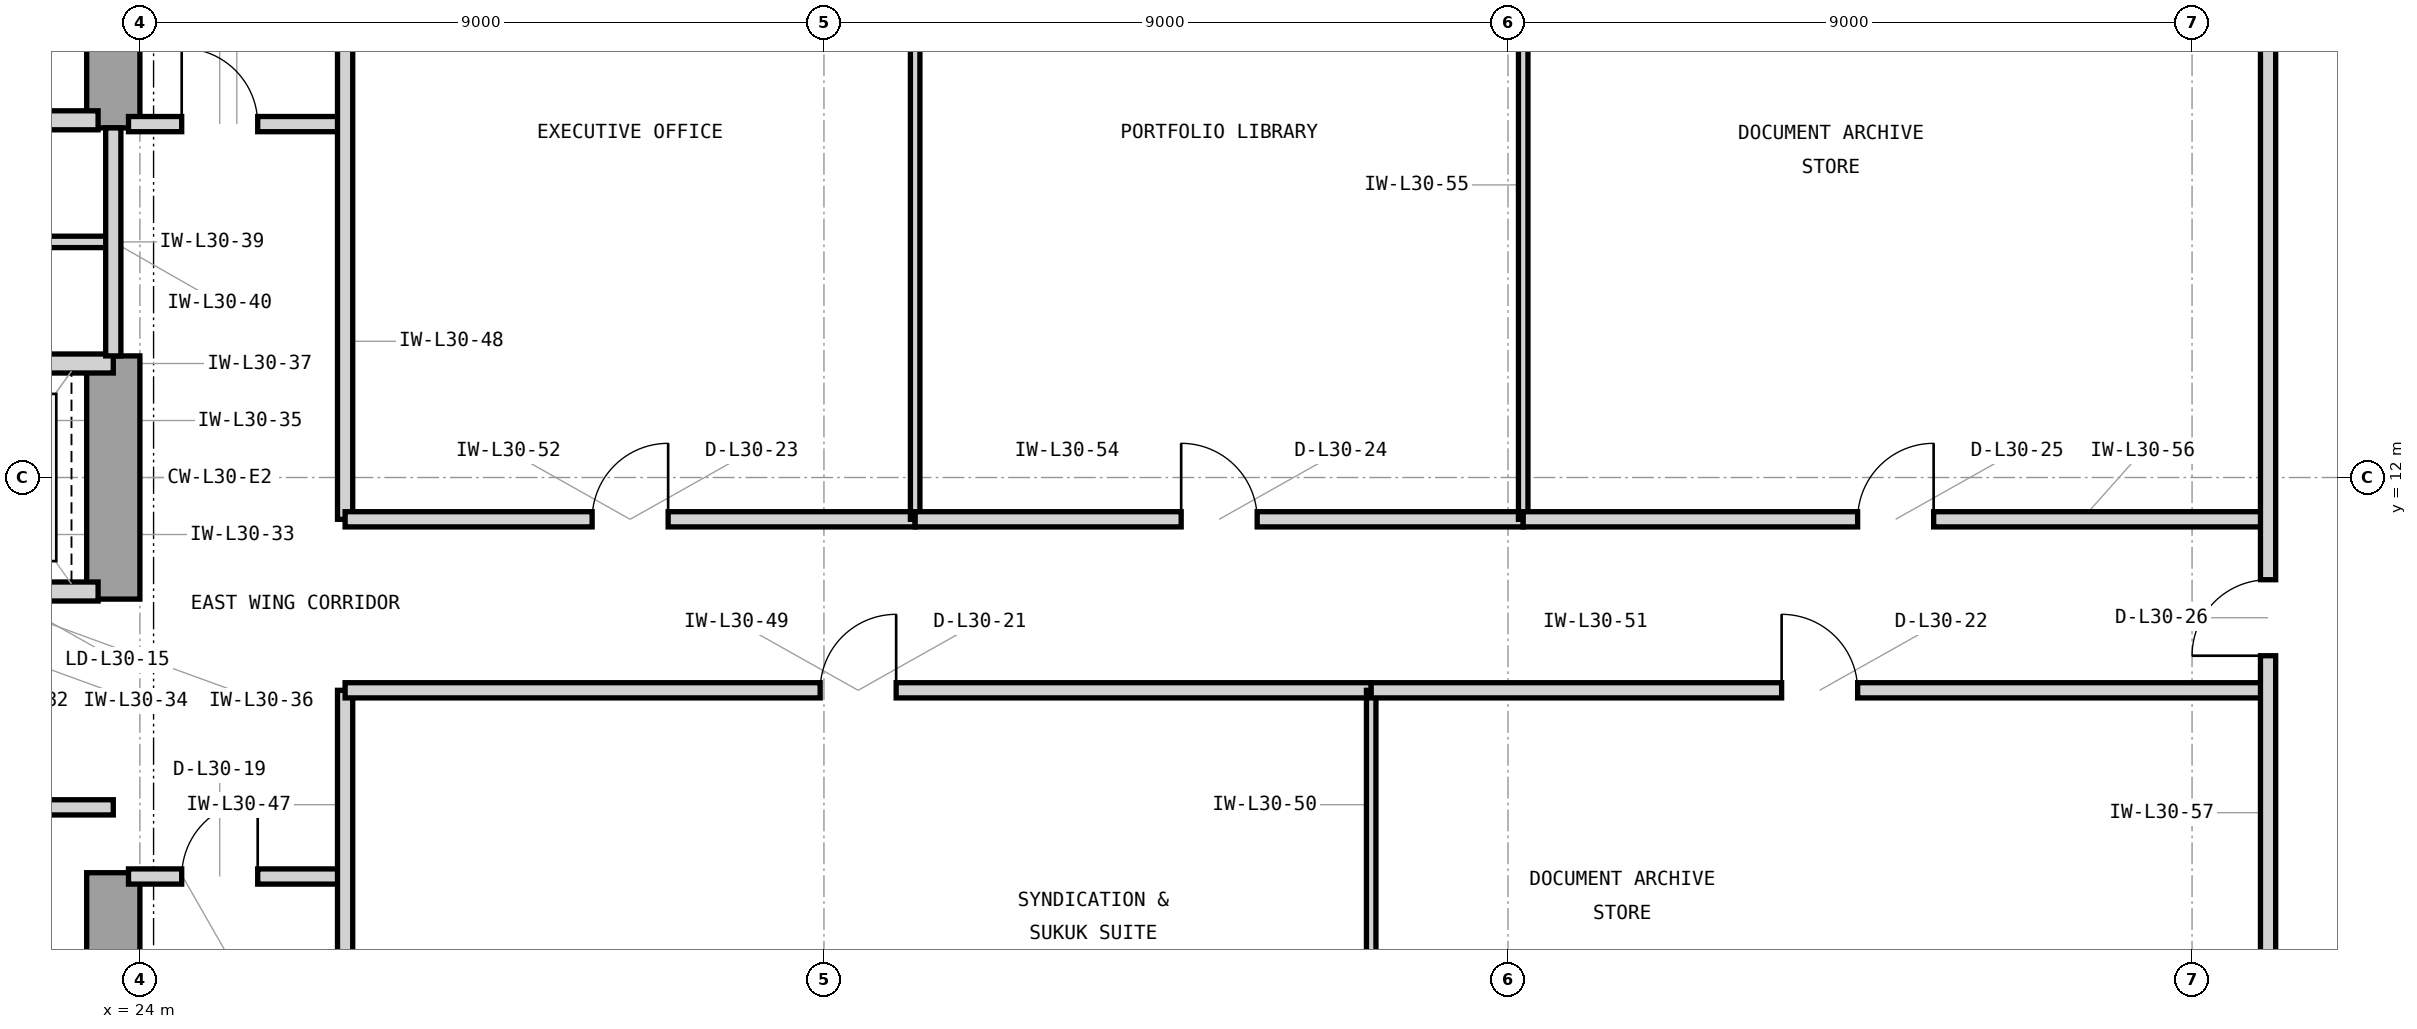
"""IFC4 building model, lengths in metres.
Left out: names, types, materials, properties, quantities, classifications, styles, units other than length and angle.
Written with IfcOpenShell. Run it as: python <this file> out.ifc"""

import sys

from ifc_helpers import new_model, si_unit, direction, frame, frame_2d, origin, place, context, subcontext, project, spatial, rectangle, extrude, element, fill, save


model = new_model("IFC4")
c1 = context("Model", 3, precision=1e-05, world=origin(), true_north=direction((0.0, 1.0)))
c2 = subcontext(c1, "Body", "Model", "MODEL_VIEW")
j1 = project(units=[si_unit("LENGTHUNIT", "METRE"), si_unit("PLANEANGLEUNIT", "RADIAN")], contexts=[c1])
p1 = place(None, origin())
s1 = spatial("IfcSite", under=j1, at=p1, CompositionType="ELEMENT")
p2 = place(p1, origin())
s2 = spatial("IfcBuilding", under=s1, at=p2, CompositionType="ELEMENT")
p3 = place(p2, frame((0.0, 0.0, 128.4)))
s3 = spatial("IfcBuildingStorey", under=s2, at=p3, CompositionType="ELEMENT", Elevation=128.4)
p4 = place(p3, frame((23.65, 3.7, 0.0), z_axis=(0.0, 0.0, 1.0), x_axis=(0.0, 1.0, 0.0)))
e1 = element("IfcWall", 1, at=p4, inside=s3, PredefinedType="SHEAR", context=c2, shape_type="SweptSolid", body=[
    extrude(rectangle(XDim=3.1, YDim=0.7, at=frame_2d((1.55, 0.0))), origin(), (0.0, 0.0, 1.0), 3.9),
])
p5 = place(p3, frame((23.65, 10.4, 0.0), z_axis=(0.0, 0.0, 1.0), x_axis=(0.0, 1.0, 0.0)))
e2 = element("IfcWall", 2, at=p5, inside=s3, PredefinedType="SHEAR", context=c2, shape_type="SweptSolid", body=[
    extrude(rectangle(XDim=3.2, YDim=0.7, at=frame_2d((1.6, 0.0))), origin(), (0.0, 0.0, 1.0), 3.9),
])
p6 = place(p3, frame((23.65, 16.6, 0.0), z_axis=(0.0, 0.0, 1.0), x_axis=(0.0, 1.0, 0.0)))
e3 = element("IfcWall", 3, at=p6, inside=s3, PredefinedType="SHEAR", context=c2, shape_type="SweptSolid", body=[
    extrude(rectangle(XDim=4.05, YDim=0.7, at=frame_2d((2.025, 0.0))), origin(), (0.0, 0.0, 1.0), 3.9),
])
p7 = place(p3, frame((21.05, 16.7, 0.0), z_axis=(0.0, 0.0, 1.0), x_axis=(1.0, 0.0, 0.0)))
e4 = element("IfcWall", 4, at=p7, inside=s3, PredefinedType="PARTITIONING", context=c2, shape_type="SweptSolid", body=[
    extrude(rectangle(XDim=2.4, YDim=0.25, at=frame_2d((1.2, 0.0))), origin(), (0.0, 0.0, 1.0), 3.233),
])
p8 = place(p3, frame((20.85, 7.66, 0.0), z_axis=(0.0, 0.0, 1.0), x_axis=(1.0, 0.0, 0.0)))
e5 = element("IfcWall", 5, at=p8, inside=s3, PredefinedType="PARTITIONING", context=c2, shape_type="SweptSolid", body=[
    extrude(rectangle(XDim=2.8, YDim=0.2, at=frame_2d((1.4, 0.0))), origin(), (0.0, 0.0, 1.0), 3.69),
])
p9 = place(p8, frame((0.95, 0.0, 0.0)))
e6 = element("IfcOpeningElement", 6, at=p9, cuts=e5, PredefinedType="OPENING", context=c2, shape_type="SweptSolid", body=[
    extrude(rectangle(XDim=0.9, YDim=2.1, at=frame_2d((0.45, 1.05))), frame((0.0, 0.11, 0.0), z_axis=(0.0, -1.0, 0.0), x_axis=(1.0, 0.0, 0.0)), (0.0, 0.0, 1.0), 0.22),
])
p10 = place(p3, frame((21.05, 10.5, 0.0), z_axis=(0.0, 0.0, 1.0), x_axis=(1.0, 0.0, 0.0)))
e7 = element("IfcWall", 7, at=p10, inside=s3, PredefinedType="PARTITIONING", context=c2, shape_type="SweptSolid", body=[
    extrude(rectangle(XDim=2.4, YDim=0.25, at=frame_2d((1.2, 0.0))), origin(), (0.0, 0.0, 1.0), 3.233),
])
p11 = place(p10, frame((0.48, 0.0, 0.0)))
e8 = element("IfcOpeningElement", 8, at=p11, cuts=e7, PredefinedType="OPENING", context=c2, shape_type="SweptSolid", body=[
    extrude(rectangle(XDim=1.15, YDim=2.25, at=frame_2d((0.575, 1.125))), frame((0.0, 0.135, 0.0), z_axis=(0.0, -1.0, 0.0), x_axis=(1.0, 0.0, 0.0)), (0.0, 0.0, 1.0), 0.27),
])
p12 = place(p3, frame((14.7, 13.5, 0.0), z_axis=(0.0, 0.0, 1.0), x_axis=(1.0, 0.0, 0.0)))
e9 = element("IfcWall", 9, at=p12, inside=s3, PredefinedType="PARTITIONING", context=c2, shape_type="SweptSolid", body=[
    extrude(rectangle(XDim=8.95, YDim=0.25, at=frame_2d((4.475, 0.0))), origin(), (0.0, 0.0, 1.0), 3.233),
])
p13 = place(p3, frame((18.45, 15.1, 0.0), z_axis=(0.0, 0.0, 1.0), x_axis=(1.0, 0.0, 0.0)))
e10 = element("IfcWall", 10, at=p13, inside=s3, PredefinedType="PARTITIONING", context=c2, shape_type="SweptSolid", body=[
    extrude(rectangle(XDim=5.2, YDim=0.15, at=frame_2d((2.6, 0.0))), origin(), (0.0, 0.0, 1.0), 3.69),
])
p14 = place(p3, frame((23.65, 13.6, 0.0), z_axis=(0.0, 0.0, 1.0), x_axis=(0.0, 1.0, 0.0)))
e11 = element("IfcWall", 11, at=p14, inside=s3, PredefinedType="PARTITIONING", context=c2, shape_type="SweptSolid", body=[
    extrude(rectangle(XDim=3.0, YDim=0.2, at=frame_2d((1.5, 0.0))), origin(), (0.0, 0.0, 1.0), 3.69),
])
p15 = place(p3, frame((23.85, 6.75, 0.0), z_axis=(0.0, 0.0, 1.0), x_axis=(1.0, 0.0, 0.0)))
e12 = element("IfcWall", 12, at=p15, inside=s3, PredefinedType="PARTITIONING", context=c2, shape_type="SweptSolid", body=[
    extrude(rectangle(XDim=2.85, YDim=0.2, at=frame_2d((1.425, 0.0))), origin(), (0.0, 0.0, 1.0), 3.69),
])
p16 = place(p15, frame((0.7, 0.0, 0.0)))
e13 = element("IfcOpeningElement", 13, at=p16, cuts=e12, PredefinedType="OPENING", context=c2, shape_type="SweptSolid", body=[
    extrude(rectangle(XDim=1.0, YDim=2.15, at=frame_2d((0.5, 1.075))), frame((0.0, 0.11, 0.0), z_axis=(0.0, -1.0, 0.0), x_axis=(1.0, 0.0, 0.0)), (0.0, 0.0, 1.0), 0.22),
])
p17 = place(p3, frame((23.85, 16.65, 0.0), z_axis=(0.0, 0.0, 1.0), x_axis=(1.0, 0.0, 0.0)))
e14 = element("IfcWall", 14, at=p17, inside=s3, PredefinedType="PARTITIONING", context=c2, shape_type="SweptSolid", body=[
    extrude(rectangle(XDim=2.85, YDim=0.2, at=frame_2d((1.425, 0.0))), origin(), (0.0, 0.0, 1.0), 3.69),
])
p18 = place(p17, frame((0.7, 0.0, 0.0)))
e15 = element("IfcOpeningElement", 15, at=p18, cuts=e14, PredefinedType="OPENING", context=c2, shape_type="SweptSolid", body=[
    extrude(rectangle(XDim=1.0, YDim=2.15, at=frame_2d((0.5, 1.075))), frame((0.0, 0.11, 0.0), z_axis=(0.0, -1.0, 0.0), x_axis=(1.0, 0.0, 0.0)), (0.0, 0.0, 1.0), 0.22),
])
p19 = place(p3, frame((26.7, 3.18, 0.0), z_axis=(0.0, 0.0, 1.0), x_axis=(0.0, 1.0, 0.0)))
e16 = element("IfcWall", 16, at=p19, inside=s3, PredefinedType="PARTITIONING", context=c2, shape_type="SweptSolid", body=[
    extrude(rectangle(XDim=6.02, YDim=0.2, at=frame_2d((3.01, 0.0))), origin(), (0.0, 0.0, 1.0), 3.69),
])
p20 = place(p3, frame((26.7, 11.45, 0.0), z_axis=(0.0, 0.0, 1.0), x_axis=(0.0, 1.0, 0.0)))
e17 = element("IfcWall", 17, at=p20, inside=s3, PredefinedType="PARTITIONING", context=c2, shape_type="SweptSolid", body=[
    extrude(rectangle(XDim=9.37, YDim=0.2, at=frame_2d((4.685, 0.0))), origin(), (0.0, 0.0, 1.0), 3.69),
])
p21 = place(p3, frame((26.7, 9.2, 0.0), z_axis=(0.0, 0.0, 1.0), x_axis=(1.0, 0.0, 0.0)))
e18 = element("IfcWall", 18, at=p21, inside=s3, PredefinedType="PARTITIONING", context=c2, shape_type="SweptSolid", body=[
    extrude(rectangle(XDim=13.5, YDim=0.2, at=frame_2d((6.75, 0.0))), origin(), (0.0, 0.0, 1.0), 3.69),
])
p22 = place(p21, frame((6.25, 0.0, 0.0)))
e19 = element("IfcOpeningElement", 19, at=p22, cuts=e18, PredefinedType="OPENING", context=c2, shape_type="SweptSolid", body=[
    extrude(rectangle(XDim=1.0, YDim=2.15, at=frame_2d((0.5, 1.075))), frame((0.0, 0.11, 0.0), z_axis=(0.0, -1.0, 0.0), x_axis=(1.0, 0.0, 0.0)), (0.0, 0.0, 1.0), 0.22),
])
p23 = place(p3, frame((40.2, 3.18, 0.0), z_axis=(0.0, 0.0, 1.0), x_axis=(0.0, 1.0, 0.0)))
e20 = element("IfcWall", 20, at=p23, inside=s3, PredefinedType="PARTITIONING", context=c2, shape_type="SweptSolid", body=[
    extrude(rectangle(XDim=6.02, YDim=0.125, at=frame_2d((3.01, 0.0))), origin(), (0.0, 0.0, 1.0), 3.69),
])
p24 = place(p3, frame((40.2, 9.2, 0.0), z_axis=(0.0, 0.0, 1.0), x_axis=(1.0, 0.0, 0.0)))
e21 = element("IfcWall", 21, at=p24, inside=s3, PredefinedType="PARTITIONING", context=c2, shape_type="SweptSolid", body=[
    extrude(rectangle(XDim=11.8, YDim=0.2, at=frame_2d((5.9, 0.0))), origin(), (0.0, 0.0, 1.0), 3.69),
])
p25 = place(p24, frame((5.4, 0.0, 0.0)))
e22 = element("IfcOpeningElement", 22, at=p25, cuts=e21, PredefinedType="OPENING", context=c2, shape_type="SweptSolid", body=[
    extrude(rectangle(XDim=1.0, YDim=2.15, at=frame_2d((0.5, 1.075))), frame((0.0, 0.11, 0.0), z_axis=(0.0, -1.0, 0.0), x_axis=(1.0, 0.0, 0.0)), (0.0, 0.0, 1.0), 0.22),
])
p26 = place(p3, frame((26.7, 11.45, 0.0), z_axis=(0.0, 0.0, 1.0), x_axis=(1.0, 0.0, 0.0)))
e23 = element("IfcWall", 23, at=p26, inside=s3, PredefinedType="PARTITIONING", context=c2, shape_type="SweptSolid", body=[
    extrude(rectangle(XDim=7.5, YDim=0.2, at=frame_2d((3.75, 0.0))), origin(), (0.0, 0.0, 1.0), 3.69),
])
p27 = place(p26, frame((3.25, 0.0, 0.0)))
e24 = element("IfcOpeningElement", 24, at=p27, cuts=e23, PredefinedType="OPENING", context=c2, shape_type="SweptSolid", body=[
    extrude(rectangle(XDim=1.0, YDim=2.15, at=frame_2d((0.5, 1.075))), frame((0.0, 0.11, 0.0), z_axis=(0.0, -1.0, 0.0), x_axis=(1.0, 0.0, 0.0)), (0.0, 0.0, 1.0), 0.22),
])
p28 = place(p3, frame((34.2, 11.45, 0.0), z_axis=(0.0, 0.0, 1.0), x_axis=(0.0, 1.0, 0.0)))
e25 = element("IfcWall", 25, at=p28, inside=s3, PredefinedType="PARTITIONING", context=c2, shape_type="SweptSolid", body=[
    extrude(rectangle(XDim=9.37, YDim=0.125, at=frame_2d((4.685, 0.0))), origin(), (0.0, 0.0, 1.0), 3.69),
])
p29 = place(p3, frame((34.2, 11.45, 0.0), z_axis=(0.0, 0.0, 1.0), x_axis=(1.0, 0.0, 0.0)))
e26 = element("IfcWall", 26, at=p29, inside=s3, PredefinedType="PARTITIONING", context=c2, shape_type="SweptSolid", body=[
    extrude(rectangle(XDim=8.0, YDim=0.2, at=frame_2d((4.0, 0.0))), origin(), (0.0, 0.0, 1.0), 3.69),
])
p30 = place(p29, frame((3.5, 0.0, 0.0)))
e27 = element("IfcOpeningElement", 27, at=p30, cuts=e26, PredefinedType="OPENING", context=c2, shape_type="SweptSolid", body=[
    extrude(rectangle(XDim=1.0, YDim=2.15, at=frame_2d((0.5, 1.075))), frame((0.0, 0.11, 0.0), z_axis=(0.0, -1.0, 0.0), x_axis=(1.0, 0.0, 0.0)), (0.0, 0.0, 1.0), 0.22),
])
p31 = place(p3, frame((42.2, 11.45, 0.0), z_axis=(0.0, 0.0, 1.0), x_axis=(0.0, 1.0, 0.0)))
e28 = element("IfcWall", 28, at=p31, inside=s3, PredefinedType="PARTITIONING", context=c2, shape_type="SweptSolid", body=[
    extrude(rectangle(XDim=8.8, YDim=0.125, at=frame_2d((4.4, 0.0))), origin(), (0.0, 0.0, 1.0), 3.69),
])
p32 = place(p3, frame((42.2, 11.45, 0.0), z_axis=(0.0, 0.0, 1.0), x_axis=(1.0, 0.0, 0.0)))
e29 = element("IfcWall", 29, at=p32, inside=s3, PredefinedType="PARTITIONING", context=c2, shape_type="SweptSolid", body=[
    extrude(rectangle(XDim=9.8, YDim=0.2, at=frame_2d((4.9, 0.0))), origin(), (0.0, 0.0, 1.0), 3.69),
])
p33 = place(p32, frame((4.4, 0.0, 0.0)))
e30 = element("IfcOpeningElement", 30, at=p33, cuts=e29, PredefinedType="OPENING", context=c2, shape_type="SweptSolid", body=[
    extrude(rectangle(XDim=1.0, YDim=2.15, at=frame_2d((0.5, 1.075))), frame((0.0, 0.11, 0.0), z_axis=(0.0, -1.0, 0.0), x_axis=(1.0, 0.0, 0.0)), (0.0, 0.0, 1.0), 0.22),
])
p34 = place(p3, frame((52.0, 3.18, 0.0), z_axis=(0.0, 0.0, 1.0), x_axis=(0.0, 1.0, 0.0)))
e31 = element("IfcWall", 31, at=p34, inside=s3, PredefinedType="PARTITIONING", context=c2, shape_type="SweptSolid", body=[
    extrude(rectangle(XDim=17.64, YDim=0.2, at=frame_2d((8.82, 0.0))), origin(), (0.0, 0.0, 1.0), 3.69),
])
p35 = place(p34, frame((6.475, 0.0, 0.0)))
e32 = element("IfcOpeningElement", 32, at=p35, cuts=e31, PredefinedType="OPENING", context=c2, shape_type="SweptSolid", body=[
    extrude(rectangle(XDim=1.0, YDim=2.15, at=frame_2d((0.5, 1.075))), frame((0.0, 0.11, 0.0), z_axis=(0.0, -1.0, 0.0), x_axis=(1.0, 0.0, 0.0)), (0.0, 0.0, 1.0), 0.22),
])
p36 = place(p16, origin())
e33 = element("IfcDoor", 33, at=p36, inside=s3, OperationType="SINGLE_SWING_RIGHT", PredefinedType="DOOR", context=c2, shape_type="SweptSolid", body=[
    extrude(rectangle(XDim=1.0, YDim=2.15, at=frame_2d((0.5, 1.075))), frame((0.0, 0.025, 0.0), z_axis=(0.0, -1.0, 0.0), x_axis=(1.0, 0.0, 0.0)), (0.0, 0.0, 1.0), 0.05),
])
fill(e13, e33)
p37 = place(p18, origin())
e34 = element("IfcDoor", 34, at=p37, inside=s3, OperationType="SINGLE_SWING_LEFT", PredefinedType="DOOR", context=c2, shape_type="SweptSolid", body=[
    extrude(rectangle(XDim=1.0, YDim=2.15, at=frame_2d((0.5, 1.075))), frame((0.0, 0.025, 0.0), z_axis=(0.0, -1.0, 0.0), x_axis=(1.0, 0.0, 0.0)), (0.0, 0.0, 1.0), 0.05),
])
fill(e15, e34)
p38 = place(p22, origin())
e35 = element("IfcDoor", 35, at=p38, inside=s3, OperationType="SINGLE_SWING_RIGHT", PredefinedType="DOOR", context=c2, shape_type="SweptSolid", body=[
    extrude(rectangle(XDim=1.0, YDim=2.15, at=frame_2d((0.5, 1.075))), frame((0.0, 0.025, 0.0), z_axis=(0.0, -1.0, 0.0), x_axis=(1.0, 0.0, 0.0)), (0.0, 0.0, 1.0), 0.05),
])
fill(e19, e35)
p39 = place(p25, origin())
e36 = element("IfcDoor", 36, at=p39, inside=s3, OperationType="SINGLE_SWING_LEFT", PredefinedType="DOOR", context=c2, shape_type="SweptSolid", body=[
    extrude(rectangle(XDim=1.0, YDim=2.15, at=frame_2d((0.5, 1.075))), frame((0.0, 0.025, 0.0), z_axis=(0.0, -1.0, 0.0), x_axis=(1.0, 0.0, 0.0)), (0.0, 0.0, 1.0), 0.05),
])
fill(e22, e36)
p40 = place(p27, origin())
e37 = element("IfcDoor", 37, at=p40, inside=s3, OperationType="SINGLE_SWING_RIGHT", PredefinedType="DOOR", context=c2, shape_type="SweptSolid", body=[
    extrude(rectangle(XDim=1.0, YDim=2.15, at=frame_2d((0.5, 1.075))), frame((0.0, 0.025, 0.0), z_axis=(0.0, -1.0, 0.0), x_axis=(1.0, 0.0, 0.0)), (0.0, 0.0, 1.0), 0.05),
])
fill(e24, e37)
p41 = place(p30, origin())
e38 = element("IfcDoor", 38, at=p41, inside=s3, OperationType="SINGLE_SWING_LEFT", PredefinedType="DOOR", context=c2, shape_type="SweptSolid", body=[
    extrude(rectangle(XDim=1.0, YDim=2.15, at=frame_2d((0.5, 1.075))), frame((0.0, 0.025, 0.0), z_axis=(0.0, -1.0, 0.0), x_axis=(1.0, 0.0, 0.0)), (0.0, 0.0, 1.0), 0.05),
])
fill(e27, e38)
p42 = place(p33, origin())
e39 = element("IfcDoor", 39, at=p42, inside=s3, OperationType="SINGLE_SWING_RIGHT", PredefinedType="DOOR", context=c2, shape_type="SweptSolid", body=[
    extrude(rectangle(XDim=1.0, YDim=2.15, at=frame_2d((0.5, 1.075))), frame((0.0, 0.025, 0.0), z_axis=(0.0, -1.0, 0.0), x_axis=(1.0, 0.0, 0.0)), (0.0, 0.0, 1.0), 0.05),
])
fill(e30, e39)
p43 = place(p35, origin())
e40 = element("IfcDoor", 40, at=p43, inside=s3, OperationType="SINGLE_SWING_LEFT", PredefinedType="DOOR", context=c2, shape_type="SweptSolid", body=[
    extrude(rectangle(XDim=1.0, YDim=2.15, at=frame_2d((0.5, 1.075))), frame((0.0, 0.025, 0.0), z_axis=(0.0, -1.0, 0.0), x_axis=(1.0, 0.0, 0.0)), (0.0, 0.0, 1.0), 0.05),
])
fill(e32, e40)
save(model, sys.argv[1])
